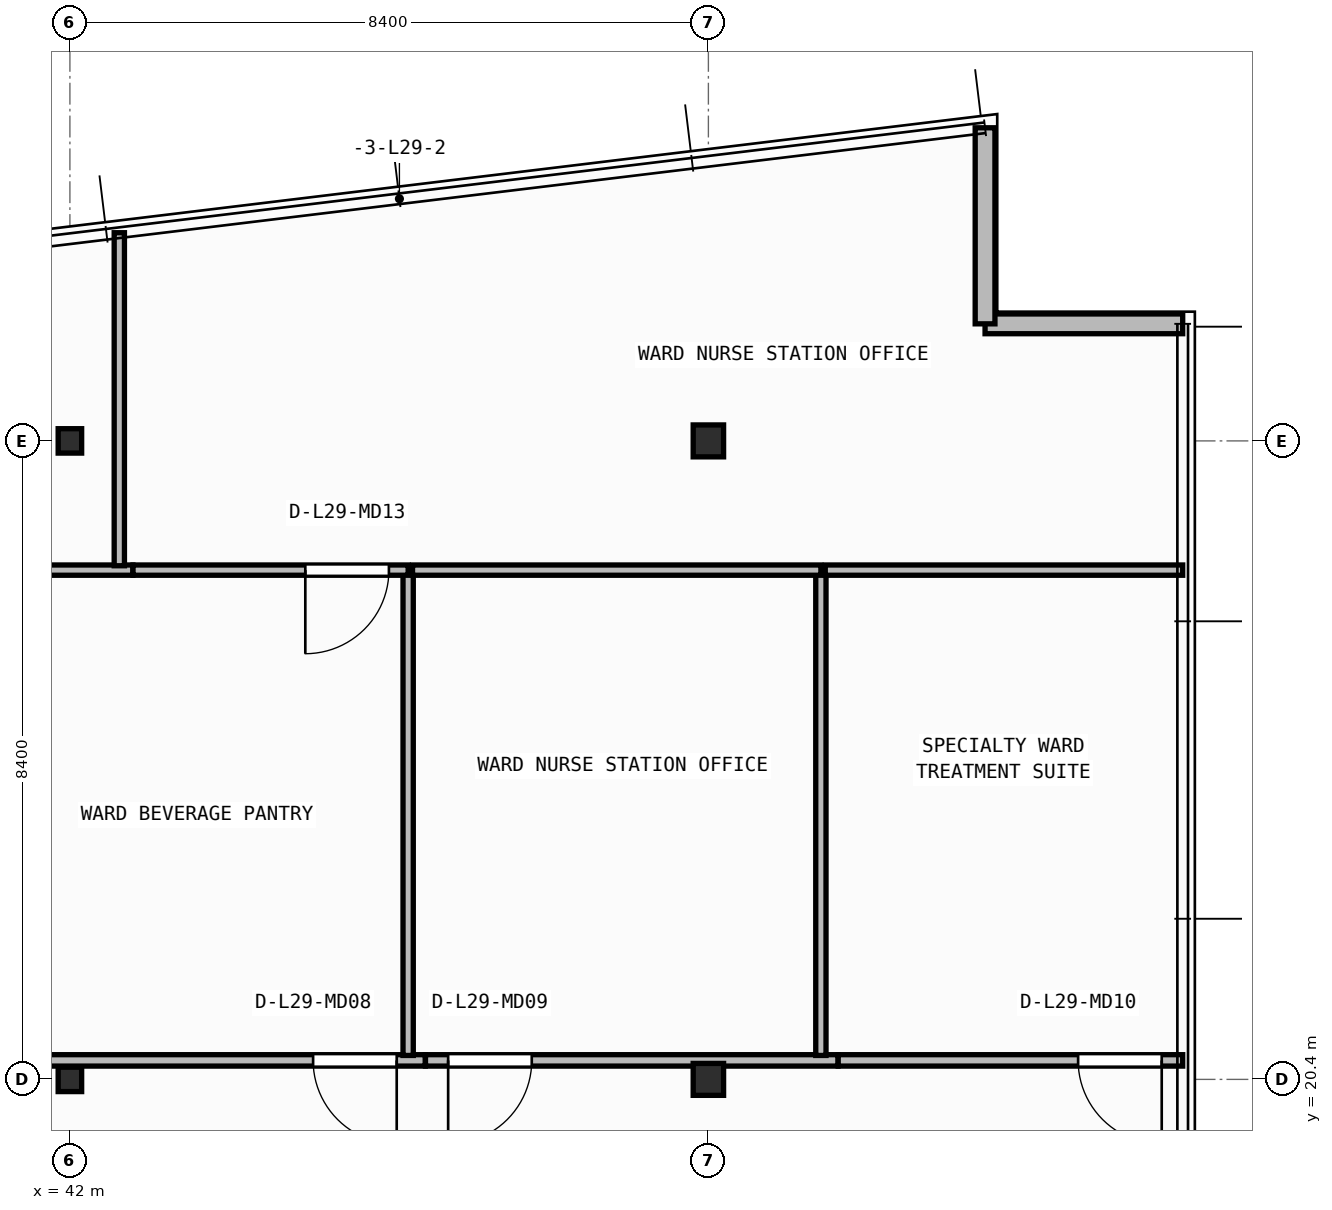
"""IFC4 building model, lengths in metres.
Left out: names, types, materials, properties, quantities, classifications, styles, units other than length and angle.
Written with IfcOpenShell. Run it as: python <this file> out.ifc"""

import sys

from ifc_helpers import new_model, si_unit, direction, frame, frame_2d, origin, origin_2d, place, context, subcontext, project, spatial, rectangle, i_section, extrude, element, fill, save


model = new_model("IFC4")
c1 = context("Model", 3, precision=1e-05, world=origin(), true_north=direction((0.0, 1.0)))
c2 = subcontext(c1, "Body", "Model", "MODEL_VIEW")
j1 = project(units=[si_unit("LENGTHUNIT", "METRE"), si_unit("PLANEANGLEUNIT", "RADIAN")], contexts=[c1])
p1 = place(None, origin())
s1 = spatial("IfcSite", under=j1, at=p1, CompositionType="ELEMENT")
p2 = place(p1, origin())
s2 = spatial("IfcBuilding", under=s1, at=p2, CompositionType="ELEMENT")
p3 = place(p2, frame((0.0, 0.0, 119.15)))
s3 = spatial("IfcBuildingStorey", under=s2, at=p3, CompositionType="ELEMENT", Elevation=119.15)
p4 = place(p3, frame((42.0, 20.4, 0.0), z_axis=(0.0, 0.0, 1.0), x_axis=(1.0, 0.0, 0.0)))
e1 = element("IfcColumn", 1, at=p4, inside=s3, PredefinedType="COLUMN", context=c2, shape_type="SweptSolid", body=[
    extrude(i_section(OverallWidth=0.309, OverallDepth=0.321, WebThickness=0.014, FlangeThickness=0.022, FilletRadius=0.017, at=origin_2d()), origin(), (0.0, 0.0, 1.0), 3.95),
])
p5 = place(p3, frame((50.4, 20.4, 0.0), z_axis=(0.0, 0.0, 1.0), x_axis=(1.0, 0.0, 0.0)))
e2 = element("IfcColumn", 2, at=p5, inside=s3, PredefinedType="COLUMN", context=c2, shape_type="SweptSolid", body=[
    extrude(i_section(OverallWidth=0.4, OverallDepth=0.42, WebThickness=0.025, FlangeThickness=0.04, at=origin_2d()), origin(), (0.0, 0.0, 1.0), 3.95),
])
p6 = place(p3, frame((42.0, 28.8, 0.0), z_axis=(0.0, 0.0, 1.0), x_axis=(1.0, 0.0, 0.0)))
e3 = element("IfcColumn", 3, at=p6, inside=s3, PredefinedType="COLUMN", context=c2, shape_type="SweptSolid", body=[
    extrude(i_section(OverallWidth=0.309, OverallDepth=0.321, WebThickness=0.014, FlangeThickness=0.022, FilletRadius=0.017, at=origin_2d()), origin(), (0.0, 0.0, 1.0), 3.95),
])
p7 = place(p3, frame((50.4, 28.8, 0.0), z_axis=(0.0, 0.0, 1.0), x_axis=(1.0, 0.0, 0.0)))
e4 = element("IfcColumn", 4, at=p7, inside=s3, PredefinedType="COLUMN", context=c2, shape_type="SweptSolid", body=[
    extrude(i_section(OverallWidth=0.4, OverallDepth=0.42, WebThickness=0.025, FlangeThickness=0.04, at=origin_2d()), origin(), (0.0, 0.0, 1.0), 3.95),
])
p8 = place(p3, frame((56.64, 30.34, 0.0), z_axis=(0.0, 0.0, 1.0), x_axis=(-1.0, 0.0, 0.0)))
e5 = element("IfcWall", 5, at=p8, inside=s3, PredefinedType="STANDARD", context=c2, shape_type="SweptSolid", body=[
    extrude(rectangle(XDim=2.6, YDim=0.26, at=frame_2d((1.3, 0.0))), origin(), (0.0, 0.0, 1.0), 3.71),
])
p9 = place(p3, frame((54.04, 30.34, 0.0), z_axis=(0.0, 0.0, 1.0), x_axis=(0.0, 1.0, 0.0)))
e6 = element("IfcWall", 6, at=p9, inside=s3, PredefinedType="STANDARD", context=c2, shape_type="SweptSolid", body=[
    extrude(rectangle(XDim=2.579, YDim=0.26, at=frame_2d((1.29, 0.0))), origin(), (0.0, 0.0, 1.0), 3.71),
])
p10 = place(p3, frame((46.676, 20.65, 0.0), z_axis=(0.0, 0.0, 1.0), x_axis=(-1.0, 0.0, 0.0)))
e7 = element("IfcWall", 7, at=p10, inside=s3, PredefinedType="PARTITIONING", context=c2, shape_type="SweptSolid", body=[
    extrude(rectangle(XDim=5.028, YDim=0.15, at=frame_2d((2.514, 0.0))), origin(), (0.0, 0.0, 1.0), 3.083),
])
p11 = place(p10, frame((0.376, 0.0, 0.0)))
e8 = element("IfcOpeningElement", 8, at=p11, cuts=e7, PredefinedType="OPENING", context=c2, shape_type="SweptSolid", body=[
    extrude(rectangle(XDim=1.1, YDim=2.1, at=frame_2d((0.55, 1.05))), frame((0.0, 0.085, 0.0), z_axis=(0.0, -1.0, 0.0), x_axis=(1.0, 0.0, 0.0)), (0.0, 0.0, 1.0), 0.17),
])
p12 = place(p3, frame((52.106, 20.65, 0.0), z_axis=(0.0, 0.0, 1.0), x_axis=(-1.0, 0.0, 0.0)))
e9 = element("IfcWall", 9, at=p12, inside=s3, PredefinedType="PARTITIONING", context=c2, shape_type="SweptSolid", body=[
    extrude(rectangle(XDim=5.428, YDim=0.15, at=frame_2d((2.714, 0.0))), origin(), (0.0, 0.0, 1.0), 3.083),
])
p13 = place(p12, frame((4.03, 0.0, 0.0)))
e10 = element("IfcOpeningElement", 10, at=p13, cuts=e9, PredefinedType="OPENING", context=c2, shape_type="SweptSolid", body=[
    extrude(rectangle(XDim=1.1, YDim=2.1, at=frame_2d((0.55, 1.05))), frame((0.0, 0.085, 0.0), z_axis=(0.0, -1.0, 0.0), x_axis=(1.0, 0.0, 0.0)), (0.0, 0.0, 1.0), 0.17),
])
p14 = place(p3, frame((56.64, 20.65, 0.0), z_axis=(0.0, 0.0, 1.0), x_axis=(-1.0, 0.0, 0.0)))
e11 = element("IfcWall", 11, at=p14, inside=s3, PredefinedType="PARTITIONING", context=c2, shape_type="SweptSolid", body=[
    extrude(rectangle(XDim=4.532, YDim=0.15, at=frame_2d((2.266, 0.0))), origin(), (0.0, 0.0, 1.0), 3.71),
])
p15 = place(p14, frame((0.276, 0.0, 0.0)))
e12 = element("IfcOpeningElement", 12, at=p15, cuts=e11, PredefinedType="OPENING", context=c2, shape_type="SweptSolid", body=[
    extrude(rectangle(XDim=1.1, YDim=2.1, at=frame_2d((0.55, 1.05))), frame((0.0, 0.085, 0.0), z_axis=(0.0, -1.0, 0.0), x_axis=(1.0, 0.0, 0.0)), (0.0, 0.0, 1.0), 0.17),
])
p16 = place(p3, frame((46.45, 20.715, 0.0), z_axis=(0.0, 0.0, 1.0), x_axis=(0.0, 1.0, 0.0)))
e13 = element("IfcWall", 13, at=p16, inside=s3, PredefinedType="PARTITIONING", context=c2, shape_type="SweptSolid", body=[
    extrude(rectangle(XDim=6.385, YDim=0.135, at=frame_2d((3.192, 0.0))), origin(), (0.0, 0.0, 1.0), 3.71),
])
p17 = place(p3, frame((42.829, 27.1, 0.0), z_axis=(0.0, 0.0, 1.0), x_axis=(-1.0, 0.0, 0.0)))
e14 = element("IfcWall", 14, at=p17, inside=s3, PredefinedType="PARTITIONING", context=c2, shape_type="SweptSolid", body=[
    extrude(rectangle(XDim=1.351, YDim=0.135, at=frame_2d((0.676, 0.0))), origin(), (0.0, 0.0, 1.0), 3.71),
])
p18 = place(p3, frame((46.45, 27.1, 0.0), z_axis=(0.0, 0.0, 1.0), x_axis=(-1.0, 0.0, 0.0)))
e15 = element("IfcWall", 15, at=p18, inside=s3, PredefinedType="PARTITIONING", context=c2, shape_type="SweptSolid", body=[
    extrude(rectangle(XDim=3.619, YDim=0.135, at=frame_2d((1.81, 0.0))), origin(), (0.0, 0.0, 1.0), 3.71),
])
p19 = place(p18, frame((0.253, 0.0, 0.0)))
e16 = element("IfcOpeningElement", 16, at=p19, cuts=e15, PredefinedType="OPENING", context=c2, shape_type="SweptSolid", body=[
    extrude(rectangle(XDim=1.1, YDim=2.1, at=frame_2d((0.55, 1.05))), frame((0.0, 0.077, 0.0), z_axis=(0.0, -1.0, 0.0), x_axis=(1.0, 0.0, 0.0)), (0.0, 0.0, 1.0), 0.155),
])
p20 = place(p3, frame((51.88, 20.715, 0.0), z_axis=(0.0, 0.0, 1.0), x_axis=(0.0, 1.0, 0.0)))
e17 = element("IfcWall", 17, at=p20, inside=s3, PredefinedType="PARTITIONING", context=c2, shape_type="SweptSolid", body=[
    extrude(rectangle(XDim=6.385, YDim=0.135, at=frame_2d((3.192, 0.0))), origin(), (0.0, 0.0, 1.0), 3.71),
])
p21 = place(p3, frame((51.88, 27.1, 0.0), z_axis=(0.0, 0.0, 1.0), x_axis=(-1.0, 0.0, 0.0)))
e18 = element("IfcWall", 18, at=p21, inside=s3, PredefinedType="PARTITIONING", context=c2, shape_type="SweptSolid", body=[
    extrude(rectangle(XDim=5.372, YDim=0.135, at=frame_2d((2.686, 0.0))), origin(), (0.0, 0.0, 1.0), 3.71),
])
p22 = place(p3, frame((56.64, 27.1, 0.0), z_axis=(0.0, 0.0, 1.0), x_axis=(-1.0, 0.0, 0.0)))
e19 = element("IfcWall", 19, at=p22, inside=s3, PredefinedType="PARTITIONING", context=c2, shape_type="SweptSolid", body=[
    extrude(rectangle(XDim=4.702, YDim=0.135, at=frame_2d((2.351, 0.0))), origin(), (0.0, 0.0, 1.0), 3.71),
])
p23 = place(p3, frame((42.65, 27.157, 0.0), z_axis=(0.0, 0.0, 1.0), x_axis=(0.0, 1.0, 0.0)))
e20 = element("IfcWall", 20, at=p23, inside=s3, PredefinedType="PARTITIONING", context=c2, shape_type="SweptSolid", body=[
    extrude(rectangle(XDim=4.381, YDim=0.135, at=frame_2d((2.191, 0.0))), origin(), (0.0, 0.0, 1.0), 3.71),
])
p24 = place(p11, origin())
e21 = element("IfcDoor", 21, at=p24, inside=s3, OperationType="SINGLE_SWING_LEFT", PredefinedType="DOOR", context=c2, shape_type="SweptSolid", body=[
    extrude(rectangle(XDim=1.1, YDim=2.1, at=frame_2d((0.55, 1.05))), frame((0.0, 0.025, 0.0), z_axis=(0.0, -1.0, 0.0), x_axis=(1.0, 0.0, 0.0)), (0.0, 0.0, 1.0), 0.05),
])
fill(e8, e21)
p25 = place(p13, origin())
e22 = element("IfcDoor", 22, at=p25, inside=s3, OperationType="SINGLE_SWING_RIGHT", PredefinedType="DOOR", context=c2, shape_type="SweptSolid", body=[
    extrude(rectangle(XDim=1.1, YDim=2.1, at=frame_2d((0.55, 1.05))), frame((0.0, 0.025, 0.0), z_axis=(0.0, -1.0, 0.0), x_axis=(1.0, 0.0, 0.0)), (0.0, 0.0, 1.0), 0.05),
])
fill(e10, e22)
p26 = place(p15, origin())
e23 = element("IfcDoor", 23, at=p26, inside=s3, OperationType="SINGLE_SWING_LEFT", PredefinedType="DOOR", context=c2, shape_type="SweptSolid", body=[
    extrude(rectangle(XDim=1.1, YDim=2.1, at=frame_2d((0.55, 1.05))), frame((0.0, 0.025, 0.0), z_axis=(0.0, -1.0, 0.0), x_axis=(1.0, 0.0, 0.0)), (0.0, 0.0, 1.0), 0.05),
])
fill(e12, e23)
p27 = place(p19, origin())
e24 = element("IfcDoor", 24, at=p27, inside=s3, OperationType="SINGLE_SWING_RIGHT", PredefinedType="DOOR", context=c2, shape_type="SweptSolid", body=[
    extrude(rectangle(XDim=1.1, YDim=2.1, at=frame_2d((0.55, 1.05))), frame((0.0, 0.025, 0.0), z_axis=(0.0, -1.0, 0.0), x_axis=(1.0, 0.0, 0.0)), (0.0, 0.0, 1.0), 0.05),
])
fill(e16, e24)
save(model, sys.argv[1])
